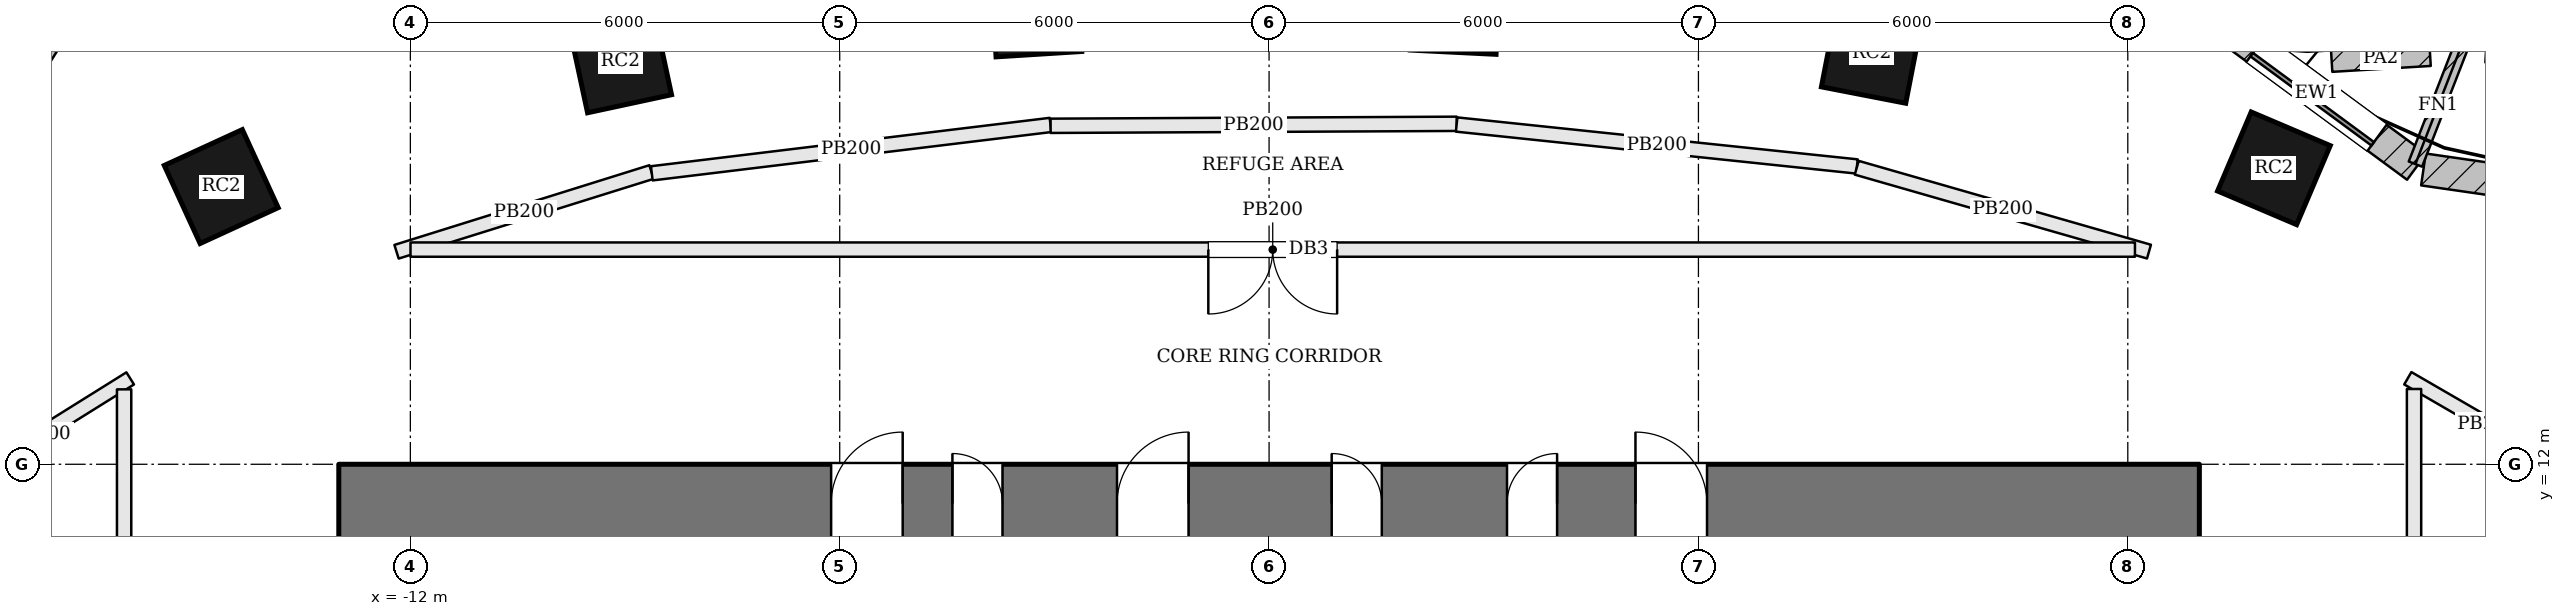
"""IFC4 building model, lengths in metres.
Left out: names, types, materials, properties, quantities, classifications, styles, units other than length and angle.
Written with IfcOpenShell. Run it as: python <this file> out.ifc"""

import sys

from ifc_helpers import new_model, si_unit, direction, frame, frame_2d, origin, origin_2d, place, context, subcontext, project, spatial, rectangle, extrude, element, fill, save


model = new_model("IFC4")
c1 = context("Model", 3, precision=1e-05, world=origin(), true_north=direction((0.0, 1.0)))
c2 = subcontext(c1, "Body", "Model", "MODEL_VIEW")
j1 = project(units=[si_unit("LENGTHUNIT", "METRE"), si_unit("PLANEANGLEUNIT", "RADIAN")], contexts=[c1])
p1 = place(None, origin())
s1 = spatial("IfcSite", under=j1, at=p1, CompositionType="ELEMENT")
p2 = place(p1, origin())
s2 = spatial("IfcBuilding", under=s1, at=p2, CompositionType="ELEMENT")
p3 = place(p2, frame((0.0, 0.0, 106.8)))
s3 = spatial("IfcBuildingStorey", under=s2, at=p3, CompositionType="ELEMENT", Elevation=106.8)
p4 = place(p3, frame((-13.0, 11.45, 0.0), z_axis=(0.0, 0.0, 1.0), x_axis=(1.0, 0.0, 0.0)))
e1 = element("IfcWall", 1, at=p4, inside=s3, PredefinedType="SHEAR", context=c2, shape_type="SweptSolid", body=[
    extrude(rectangle(XDim=26.0, YDim=1.1, at=frame_2d((13.0, 0.0))), origin(), (0.0, 0.0, 1.0), 3.6),
])
p5 = place(p4, frame((8.575, 0.0, 0.0)))
e2 = element("IfcOpeningElement", 2, at=p5, cuts=e1, PredefinedType="OPENING", context=c2, shape_type="SweptSolid", body=[
    extrude(rectangle(XDim=0.7, YDim=2.1, at=frame_2d((0.35, 1.05))), frame((0.0, 0.56, 0.0), z_axis=(0.0, -1.0, 0.0), x_axis=(1.0, 0.0, 0.0)), (0.0, 0.0, 1.0), 1.12),
])
p6 = place(p4, frame((10.875, 0.0, 0.0)))
e3 = element("IfcOpeningElement", 3, at=p6, cuts=e1, PredefinedType="OPENING", context=c2, shape_type="SweptSolid", body=[
    extrude(rectangle(XDim=1.0, YDim=2.1, at=frame_2d((0.5, 1.05))), frame((0.0, 0.56, 0.0), z_axis=(0.0, -1.0, 0.0), x_axis=(1.0, 0.0, 0.0)), (0.0, 0.0, 1.0), 1.12),
])
p7 = place(p4, frame((13.875, 0.0, 0.0)))
e4 = element("IfcOpeningElement", 4, at=p7, cuts=e1, PredefinedType="OPENING", context=c2, shape_type="SweptSolid", body=[
    extrude(rectangle(XDim=0.7, YDim=2.1, at=frame_2d((0.35, 1.05))), frame((0.0, 0.56, 0.0), z_axis=(0.0, -1.0, 0.0), x_axis=(1.0, 0.0, 0.0)), (0.0, 0.0, 1.0), 1.12),
])
p8 = place(p4, frame((16.325, 0.0, 0.0)))
e5 = element("IfcOpeningElement", 5, at=p8, cuts=e1, PredefinedType="OPENING", context=c2, shape_type="SweptSolid", body=[
    extrude(rectangle(XDim=0.7, YDim=2.1, at=frame_2d((0.35, 1.05))), frame((0.0, 0.56, 0.0), z_axis=(0.0, -1.0, 0.0), x_axis=(1.0, 0.0, 0.0)), (0.0, 0.0, 1.0), 1.12),
])
p9 = place(p4, frame((6.88, 0.0, 0.0)))
e6 = element("IfcOpeningElement", 6, at=p9, cuts=e1, PredefinedType="OPENING", context=c2, shape_type="SweptSolid", body=[
    extrude(rectangle(XDim=1.0, YDim=2.1, at=frame_2d((0.5, 1.05))), frame((0.0, 0.56, 0.0), z_axis=(0.0, -1.0, 0.0), x_axis=(1.0, 0.0, 0.0)), (0.0, 0.0, 1.0), 1.12),
])
p10 = place(p4, frame((18.12, 0.0, 0.0)))
e7 = element("IfcOpeningElement", 7, at=p10, cuts=e1, PredefinedType="OPENING", context=c2, shape_type="SweptSolid", body=[
    extrude(rectangle(XDim=1.0, YDim=2.1, at=frame_2d((0.5, 1.05))), frame((0.0, 0.56, 0.0), z_axis=(0.0, -1.0, 0.0), x_axis=(1.0, 0.0, 0.0)), (0.0, 0.0, 1.0), 1.12),
])
for number, where, z_axis, x_axis in (
    (8, (14.042, 16.136, 0.0), (0.0, 0.0, 1.0), (-0.92, 0.392, 0.0)),
    (9, (8.422, 17.749, 0.0), (0.0, 0.0, 1.0), (-0.982, 0.191, 0.0)),
    (10, (2.602, 18.358, 0.0), (0.0, 0.0, 1.0), (-0.999, 0.05, 0.0)),
    (11, (-3.254, 18.33, 0.0), (0.0, 0.0, 1.0), (-0.998, -0.063, 0.0)),
    (12, (-9.063, 17.625, 0.0), (0.0, 0.0, 1.0), (-0.978, -0.21, 0.0)),
    (13, (-14.643, 15.881, 0.0), (0.0, 0.0, 1.0), (-0.909, -0.417, 0.0)),
):
    element("IfcColumn", number, at=place(p3, frame(where, z_axis=z_axis, x_axis=x_axis)), inside=s3, PredefinedType="COLUMN", context=c2, shape_type="SweptSolid", body=[
        extrude(rectangle(XDim=1.2, YDim=1.2, at=origin_2d()), origin(), (0.0, 0.0, 1.0), 3.6),
    ])
p11 = place(p3, frame((21.825, 15.297, 0.0), z_axis=(0.0, 0.0, 1.0), x_axis=(-0.98971474215, 0.143054986527, 0.0)))
e14 = element("IfcWall", 14, at=p11, inside=s3, PredefinedType="SOLIDWALL", context=c2, shape_type="SweptSolid", body=[
    extrude(rectangle(XDim=5.753, YDim=0.45, at=frame_2d((2.876, 0.0))), origin(), (0.0, 0.0, 1.0), 3.4),
])
p12 = place(p11, frame((1.826, 0.0, 0.9)))
e15 = element("IfcOpeningElement", 15, at=p12, cuts=e14, PredefinedType="OPENING", context=c2, shape_type="SweptSolid", body=[
    extrude(rectangle(XDim=2.1, YDim=2.0, at=frame_2d((1.05, 1.0))), frame((0.0, 0.235, 0.0), z_axis=(0.0, -1.0, 0.0), x_axis=(1.0, 0.0, 0.0)), (0.0, 0.0, 1.0), 0.47),
])
p13 = place(p3, frame((16.036, 16.158, 0.0), z_axis=(0.0, 0.0, 1.0), x_axis=(-0.805181432967, 0.593028549064, 0.0)))
e16 = element("IfcWall", 16, at=p13, inside=s3, PredefinedType="SOLIDWALL", context=c2, shape_type="SweptSolid", body=[
    extrude(rectangle(XDim=3.469, YDim=0.45, at=frame_2d((1.734, 0.0))), origin(), (0.0, 0.0, 1.0), 3.4),
])
p14 = place(p13, frame((0.684, 0.0, 0.9)))
e17 = element("IfcOpeningElement", 17, at=p14, cuts=e16, PredefinedType="OPENING", context=c2, shape_type="SweptSolid", body=[
    extrude(rectangle(XDim=2.1, YDim=2.0, at=frame_2d((1.05, 1.0))), frame((0.0, 0.235, 0.0), z_axis=(0.0, -1.0, 0.0), x_axis=(1.0, 0.0, 0.0)), (0.0, 0.0, 1.0), 0.47),
])
p15 = place(p3, frame((-16.998, 18.099, 0.0), z_axis=(0.0, 0.0, 1.0), x_axis=(-0.532745661304, -0.846275404559, 0.0)))
e18 = element("IfcWall", 18, at=p15, inside=s3, PredefinedType="SOLIDWALL", context=c2, shape_type="SweptSolid", body=[
    extrude(rectangle(XDim=5.076, YDim=0.45, at=frame_2d((2.538, 0.0))), origin(), (0.0, 0.0, 1.0), 3.4),
])
p16 = place(p15, frame((1.638, 0.0, 0.9)))
e19 = element("IfcOpeningElement", 19, at=p16, cuts=e18, PredefinedType="OPENING", context=c2, shape_type="SweptSolid", body=[
    extrude(rectangle(XDim=1.8, YDim=2.0, at=frame_2d((0.9, 1.0))), frame((0.0, 0.235, 0.0), z_axis=(0.0, -1.0, 0.0), x_axis=(1.0, 0.0, 0.0)), (0.0, 0.0, 1.0), 0.47),
])
p17 = place(p3, frame((16.019, 16.195, 0.0), z_axis=(0.0, 0.0, 1.0), x_axis=(0.362641522028, 0.931928713208, 0.0)))
e20 = element("IfcWall", 20, at=p17, inside=s3, PredefinedType="SOLIDWALL", context=c2, shape_type="SweptSolid", body=[
    extrude(rectangle(XDim=1.75, YDim=0.2, at=frame_2d((0.875, 0.0))), origin(), (0.0, 0.0, 1.0), 3.4),
])
p18 = place(p3, frame((14.849, 17.634, 0.0), z_axis=(0.0, 0.0, 1.0), x_axis=(0.998215844774, 0.059708686491, 0.0)))
e21 = element("IfcWall", 21, at=p18, inside=s3, PredefinedType="PARAPET", context=c2, shape_type="SweptSolid", body=[
    extrude(rectangle(XDim=1.378, YDim=0.3, at=frame_2d((0.689, 0.0))), origin(), (0.0, 0.0, 1.0), 1.1),
])
p19 = place(p3, frame((17.005, 17.765, 0.0), z_axis=(0.0, 0.0, 1.0), x_axis=(0.99833431707, -0.05769394562, 0.0)))
e22 = element("IfcWall", 22, at=p19, inside=s3, PredefinedType="PARAPET", context=c2, shape_type="SweptSolid", body=[
    extrude(rectangle(XDim=3.411, YDim=0.3, at=frame_2d((1.705, 0.0))), origin(), (0.0, 0.0, 1.0), 1.1),
])
p20 = place(p3, frame((-18.422, 11.635, 0.0), z_axis=(0.0, 0.0, 1.0), x_axis=(0.848299824463, 0.529516201656, 0.0)))
e23 = element("IfcWall", 23, at=p20, inside=s3, PredefinedType="PARTITIONING", context=c2, shape_type="SweptSolid", body=[
    extrude(rectangle(XDim=2.955, YDim=0.2, at=frame_2d((1.478, 0.0))), origin(), (0.0, 0.0, 1.0), 3.4),
])
p21 = place(p3, frame((-16.0, 13.047, 0.0), z_axis=(0.0, 0.0, 1.0), x_axis=(0.0, -1.0, 0.0)))
e24 = element("IfcWall", 24, at=p21, inside=s3, PredefinedType="PARTITIONING", context=c2, shape_type="SweptSolid", body=[
    extrude(rectangle(XDim=18.947, YDim=0.2, at=frame_2d((9.474, 0.0))), origin(), (0.0, 0.0, 1.0), 3.4),
])
p22 = place(p21, frame((7.647, 0.0, 0.0)))
e25 = element("IfcOpeningElement", 25, at=p22, cuts=e24, PredefinedType="OPENING", context=c2, shape_type="SweptSolid", body=[
    extrude(rectangle(XDim=1.8, YDim=2.1, at=frame_2d((0.9, 1.05))), frame((0.0, 0.11, 0.0), z_axis=(0.0, -1.0, 0.0), x_axis=(1.0, 0.0, 0.0)), (0.0, 0.0, 1.0), 0.22),
])
p23 = place(p3, frame((15.913, 13.202, 0.0), z_axis=(0.0, 0.0, 1.0), x_axis=(0.86524014554, -0.501357647339, 0.0)))
e26 = element("IfcWall", 26, at=p23, inside=s3, PredefinedType="PARTITIONING", context=c2, shape_type="SweptSolid", body=[
    extrude(rectangle(XDim=2.575, YDim=0.2, at=frame_2d((1.288, 0.0))), origin(), (0.0, 0.0, 1.0), 3.4),
])
p24 = place(p3, frame((16.0, -5.9, 0.0), z_axis=(0.0, 0.0, 1.0), x_axis=(0.0, 1.0, 0.0)))
e27 = element("IfcWall", 27, at=p24, inside=s3, PredefinedType="PARTITIONING", context=c2, shape_type="SweptSolid", body=[
    extrude(rectangle(XDim=18.952, YDim=0.2, at=frame_2d((9.476, 0.0))), origin(), (0.0, 0.0, 1.0), 3.4),
])
p25 = place(p24, frame((9.5, 0.0, 0.0)))
e28 = element("IfcOpeningElement", 28, at=p25, cuts=e27, PredefinedType="OPENING", context=c2, shape_type="SweptSolid", body=[
    extrude(rectangle(XDim=1.8, YDim=2.1, at=frame_2d((0.9, 1.05))), frame((0.0, 0.11, 0.0), z_axis=(0.0, -1.0, 0.0), x_axis=(1.0, 0.0, 0.0)), (0.0, 0.0, 1.0), 0.22),
])
p26 = place(p3, frame((-12.193, 14.97, 0.0), z_axis=(0.0, 0.0, 1.0), x_axis=(0.954441570864, 0.298397868301, 0.0)))
e29 = element("IfcWall", 29, at=p26, inside=s3, PredefinedType="PARTITIONING", context=c2, shape_type="SweptSolid", body=[
    extrude(rectangle(XDim=3.733, YDim=0.2, at=frame_2d((1.867, 0.0))), origin(), (0.0, 0.0, 1.0), 3.4),
])
p27 = place(p3, frame((-8.626, 16.066, 0.0), z_axis=(0.0, 0.0, 1.0), x_axis=(0.992720392358, 0.120441780942, 0.0)))
e30 = element("IfcWall", 30, at=p27, inside=s3, PredefinedType="PARTITIONING", context=c2, shape_type="SweptSolid", body=[
    extrude(rectangle(XDim=5.613, YDim=0.2, at=frame_2d((2.806, 0.0))), origin(), (0.0, 0.0, 1.0), 3.4),
])
p28 = place(p3, frame((-3.053, 16.73, 0.0), z_axis=(0.0, 0.0, 1.0), x_axis=(0.999987762334, 0.004947239951, 0.0)))
e31 = element("IfcWall", 31, at=p28, inside=s3, PredefinedType="PARTITIONING", context=c2, shape_type="SweptSolid", body=[
    extrude(rectangle(XDim=5.675, YDim=0.2, at=frame_2d((2.837, 0.0))), origin(), (0.0, 0.0, 1.0), 3.4),
])
p29 = place(p3, frame((2.621, 16.748, 0.0), z_axis=(0.0, 0.0, 1.0), x_axis=(0.99455907377, -0.104174127222, 0.0)))
e32 = element("IfcWall", 32, at=p29, inside=s3, PredefinedType="PARTITIONING", context=c2, shape_type="SweptSolid", body=[
    extrude(rectangle(XDim=5.625, YDim=0.2, at=frame_2d((2.812, 0.0))), origin(), (0.0, 0.0, 1.0), 3.4),
])
p30 = place(p3, frame((8.212, 16.144, 0.0), z_axis=(0.0, 0.0, 1.0), x_axis=(0.961195849484, -0.275866886261, 0.0)))
e33 = element("IfcWall", 33, at=p30, inside=s3, PredefinedType="PARTITIONING", context=c2, shape_type="SweptSolid", body=[
    extrude(rectangle(XDim=4.249, YDim=0.2, at=frame_2d((2.125, 0.0))), origin(), (0.0, 0.0, 1.0), 3.4),
])
p31 = place(p3, frame((12.1, 15.0, 0.0), z_axis=(0.0, 0.0, 1.0), x_axis=(-1.0, 0.0, 0.0)))
e34 = element("IfcWall", 34, at=p31, inside=s3, PredefinedType="PARTITIONING", context=c2, shape_type="SweptSolid", body=[
    extrude(rectangle(XDim=24.098, YDim=0.2, at=frame_2d((12.049, 0.0))), origin(), (0.0, 0.0, 1.0), 3.4),
])
p32 = place(p31, frame((11.149, 0.0, 0.0)))
e35 = element("IfcOpeningElement", 35, at=p32, cuts=e34, PredefinedType="OPENING", context=c2, shape_type="SweptSolid", body=[
    extrude(rectangle(XDim=1.8, YDim=2.1, at=frame_2d((0.9, 1.05))), frame((0.0, 0.11, 0.0), z_axis=(0.0, -1.0, 0.0), x_axis=(1.0, 0.0, 0.0)), (0.0, 0.0, 1.0), 0.22),
])
p33 = place(p14, origin())
e36 = element("IfcWindow", 36, at=p33, inside=s3, PartitioningType="SINGLE_PANEL", PredefinedType="WINDOW", context=c2, shape_type="SweptSolid", body=[
    extrude(rectangle(XDim=2.1, YDim=2.0, at=frame_2d((1.05, 1.0))), frame((0.0, 0.135, 0.0), z_axis=(0.0, -1.0, 0.0), x_axis=(1.0, 0.0, 0.0)), (0.0, 0.0, 1.0), 0.06),
])
fill(e17, e36)
p34 = place(p5, origin())
e37 = element("IfcDoor", 37, at=p34, inside=s3, OperationType="SINGLE_SWING_LEFT", PredefinedType="DOOR", context=c2, shape_type="SweptSolid", body=[
    extrude(rectangle(XDim=0.7, YDim=2.1, at=frame_2d((0.35, 1.05))), frame((0.0, 0.025, 0.0), z_axis=(0.0, -1.0, 0.0), x_axis=(1.0, 0.0, 0.0)), (0.0, 0.0, 1.0), 0.05),
])
fill(e2, e37)
p35 = place(p6, origin())
e38 = element("IfcDoor", 38, at=p35, inside=s3, OperationType="SINGLE_SWING_RIGHT", PredefinedType="DOOR", context=c2, shape_type="SweptSolid", body=[
    extrude(rectangle(XDim=1.0, YDim=2.1, at=frame_2d((0.5, 1.05))), frame((0.0, 0.025, 0.0), z_axis=(0.0, -1.0, 0.0), x_axis=(1.0, 0.0, 0.0)), (0.0, 0.0, 1.0), 0.05),
])
fill(e3, e38)
p36 = place(p7, origin())
e39 = element("IfcDoor", 39, at=p36, inside=s3, OperationType="SINGLE_SWING_LEFT", PredefinedType="DOOR", context=c2, shape_type="SweptSolid", body=[
    extrude(rectangle(XDim=0.7, YDim=2.1, at=frame_2d((0.35, 1.05))), frame((0.0, 0.025, 0.0), z_axis=(0.0, -1.0, 0.0), x_axis=(1.0, 0.0, 0.0)), (0.0, 0.0, 1.0), 0.05),
])
fill(e4, e39)
p37 = place(p8, origin())
e40 = element("IfcDoor", 40, at=p37, inside=s3, OperationType="SINGLE_SWING_RIGHT", PredefinedType="DOOR", context=c2, shape_type="SweptSolid", body=[
    extrude(rectangle(XDim=0.7, YDim=2.1, at=frame_2d((0.35, 1.05))), frame((0.0, 0.025, 0.0), z_axis=(0.0, -1.0, 0.0), x_axis=(1.0, 0.0, 0.0)), (0.0, 0.0, 1.0), 0.05),
])
fill(e5, e40)
p38 = place(p9, origin())
e41 = element("IfcDoor", 41, at=p38, inside=s3, OperationType="SINGLE_SWING_RIGHT", PredefinedType="DOOR", context=c2, shape_type="SweptSolid", body=[
    extrude(rectangle(XDim=1.0, YDim=2.1, at=frame_2d((0.5, 1.05))), frame((0.0, 0.025, 0.0), z_axis=(0.0, -1.0, 0.0), x_axis=(1.0, 0.0, 0.0)), (0.0, 0.0, 1.0), 0.05),
])
fill(e6, e41)
p39 = place(p10, origin())
e42 = element("IfcDoor", 42, at=p39, inside=s3, OperationType="SINGLE_SWING_LEFT", PredefinedType="DOOR", context=c2, shape_type="SweptSolid", body=[
    extrude(rectangle(XDim=1.0, YDim=2.1, at=frame_2d((0.5, 1.05))), frame((0.0, 0.025, 0.0), z_axis=(0.0, -1.0, 0.0), x_axis=(1.0, 0.0, 0.0)), (0.0, 0.0, 1.0), 0.05),
])
fill(e7, e42)
p40 = place(p32, origin())
e43 = element("IfcDoor", 43, at=p40, inside=s3, OperationType="DOUBLE_DOOR_SINGLE_SWING", PredefinedType="DOOR", context=c2, shape_type="SweptSolid", body=[
    extrude(rectangle(XDim=1.8, YDim=2.1, at=frame_2d((0.9, 1.05))), frame((0.0, 0.025, 0.0), z_axis=(0.0, -1.0, 0.0), x_axis=(1.0, 0.0, 0.0)), (0.0, 0.0, 1.0), 0.05),
])
fill(e35, e43)
save(model, sys.argv[1])
